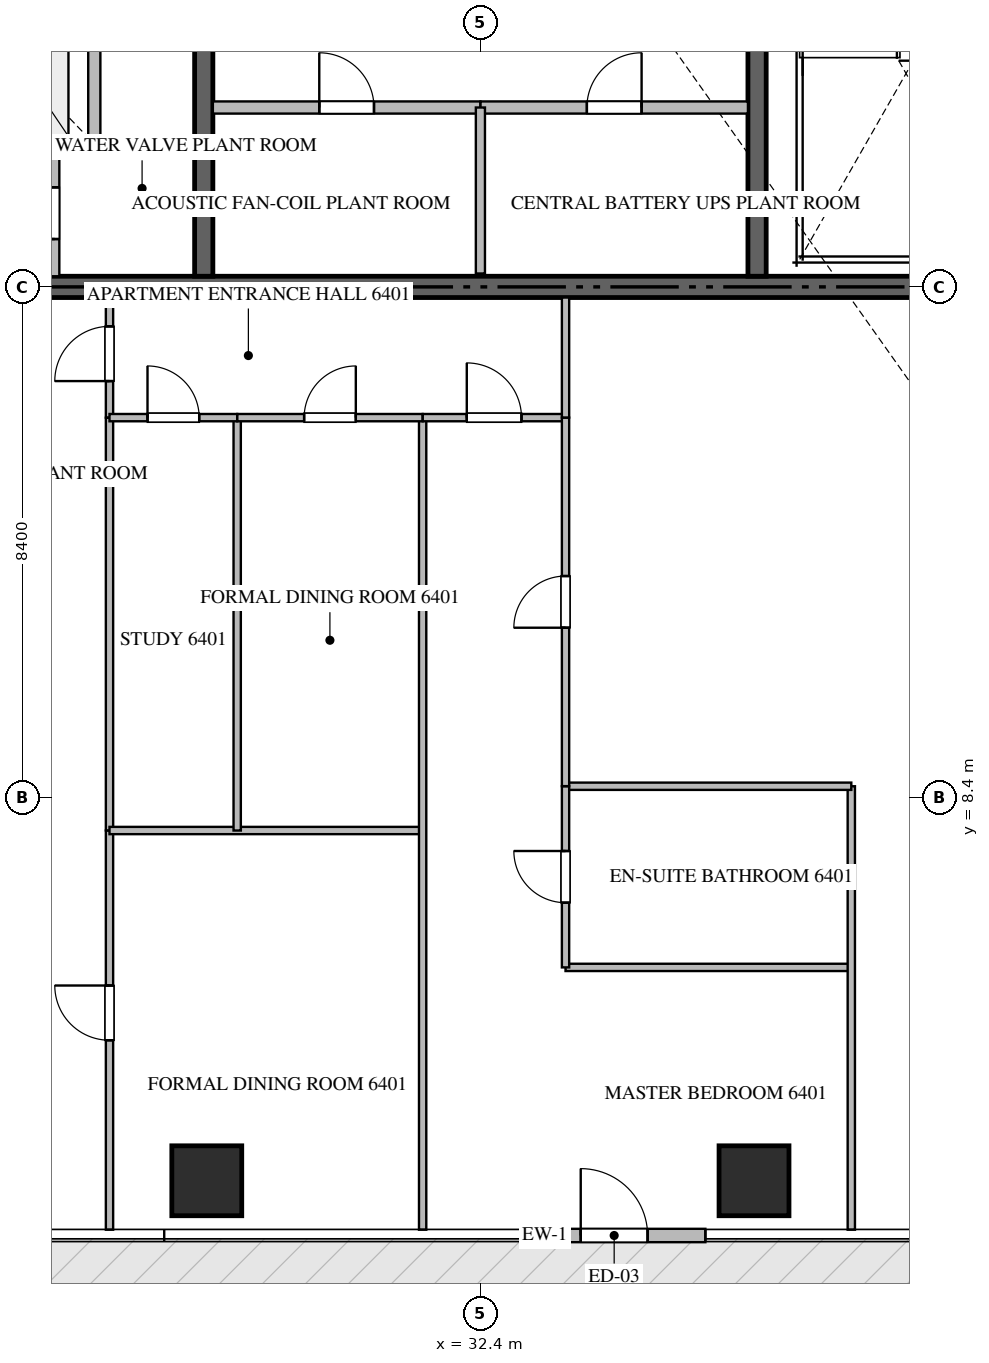
"""IFC4 building model, lengths in metres.
Left out: names, types, materials, properties, quantities, classifications, styles, units other than length and angle.
Written with IfcOpenShell. Run it as: python <this file> out.ifc"""

import sys

from ifc_helpers import new_model, si_unit, direction, frame, frame_2d, origin, origin_2d, place, context, subcontext, project, spatial, rectangle, extrude, source, transform, mapped, element, fill, save


model = new_model("IFC4")
c1 = context("Model", 3, precision=1e-05, world=origin(), true_north=direction((0.0, 1.0)))
c2 = subcontext(c1, "Body", "Model", "MODEL_VIEW")
j1 = project(units=[si_unit("LENGTHUNIT", "METRE"), si_unit("PLANEANGLEUNIT", "RADIAN")], contexts=[c1])
p1 = place(None, origin())
s1 = spatial("IfcSite", under=j1, at=p1, CompositionType="ELEMENT")
p2 = place(p1, origin())
s2 = spatial("IfcBuilding", under=s1, at=p2, CompositionType="ELEMENT")
p3 = place(p2, frame((0.0, 0.0, 256.65)))
s3 = spatial("IfcBuildingStorey", under=s2, at=p3, CompositionType="ELEMENT", Elevation=256.65)
p4 = place(p3, frame((23.4, 16.8, -0.26), z_axis=(0.0, 0.0, 1.0), x_axis=(1.0, 0.0, 0.0)))
e1 = element("IfcWall", 1, at=p4, inside=s3, PredefinedType="SHEAR", context=c2, shape_type="SweptSolid", body=[
    extrude(rectangle(XDim=18.0, YDim=0.35, at=frame_2d((9.0, 0.0))), origin(), (0.0, 0.0, 1.0), 3.848),
])
p5 = place(p3, frame((27.85, 16.975, -0.26), z_axis=(0.0, 0.0, 1.0), x_axis=(0.0, 1.0, 0.0)))
e2 = element("IfcWall", 2, at=p5, inside=s3, PredefinedType="SHEAR", context=c2, shape_type="SweptSolid", body=[
    extrude(rectangle(XDim=4.875, YDim=0.3, at=frame_2d((2.438, 0.0))), origin(), (0.0, 0.0, 1.0), 3.848),
])
p6 = place(p3, frame((36.95, 16.975, -0.26), z_axis=(0.0, 0.0, 1.0), x_axis=(0.0, 1.0, 0.0)))
e3 = element("IfcWall", 3, at=p6, inside=s3, PredefinedType="SHEAR", context=c2, shape_type="SweptSolid", body=[
    extrude(rectangle(XDim=8.375, YDim=0.3, at=frame_2d((4.188, 0.0))), origin(), (0.0, 0.0, 1.0), 3.848),
])
m1 = source(origin(), c2, "Body", "SweptSolid", [
    extrude(rectangle(XDim=1.15, YDim=1.15, at=origin_2d()), origin(), (0.0, 0.0, 1.0), 3.85),
])
for number, where, z_axis, x_axis in (
    (4, (27.9, 2.1, -0.26), (0.0, 0.0, 1.0), (1.0, 0.0, 0.0)),
    (5, (36.9, 2.1, -0.26), (0.0, 0.0, 1.0), (1.0, 0.0, 0.0)),
):
    element("IfcColumn", number, at=place(p3, frame(where, z_axis=z_axis, x_axis=x_axis)), inside=s3, PredefinedType="COLUMN", context=c2, shape_type="MappedRepresentation", body=[
        mapped(m1, transform((0.0, 0.0, 0.0), scale=1.0)),
    ])
p7 = place(p3, frame((33.1, 1.2, 0.0), z_axis=(0.0, 0.0, 1.0), x_axis=(1.0, 0.0, 0.0)))
e6 = element("IfcWall", 6, at=p7, inside=s3, PredefinedType="ELEMENTEDWALL", context=c2, shape_type="SweptSolid", body=[
    extrude(rectangle(XDim=3.0, YDim=0.22, at=frame_2d((1.5, 0.0))), origin(), (0.0, 0.0, 1.0), 3.575),
])
p8 = place(p7, frame((0.95, 0.0, 0.0)))
e7 = element("IfcOpeningElement", 7, at=p8, cuts=e6, PredefinedType="OPENING", context=c2, shape_type="SweptSolid", body=[
    extrude(rectangle(XDim=1.1, YDim=2.2, at=frame_2d((0.55, 1.1))), frame((0.0, 0.12, 0.0), z_axis=(0.0, -1.0, 0.0), x_axis=(1.0, 0.0, 0.0)), (0.0, 0.0, 1.0), 0.24),
])
p9 = place(p3, frame((26.05, 19.05, 0.0), z_axis=(0.0, 0.0, 1.0), x_axis=(0.0, 1.0, 0.0)))
e8 = element("IfcWall", 8, at=p9, inside=s3, PredefinedType="STANDARD", context=c2, shape_type="SweptSolid", body=[
    extrude(rectangle(XDim=2.5, YDim=0.2, at=frame_2d((1.25, 0.0))), origin(), (0.0, 0.0, 1.0), 3.59),
])
p10 = place(p3, frame((23.575, 19.05, 0.0), z_axis=(0.0, 0.0, 1.0), x_axis=(1.0, 0.0, 0.0)))
e9 = element("IfcWall", 9, at=p10, inside=s3, PredefinedType="STANDARD", context=c2, shape_type="SweptSolid", body=[
    extrude(rectangle(XDim=2.475, YDim=0.2, at=frame_2d((1.238, 0.0))), origin(), (0.0, 0.0, 1.0), 3.59),
])
p11 = place(p3, frame((25.4, 16.975, 0.0), z_axis=(0.0, 0.0, 1.0), x_axis=(0.0, 1.0, 0.0)))
e10 = element("IfcWall", 10, at=p11, inside=s3, PredefinedType="PARTITIONING", context=c2, shape_type="SweptSolid", body=[
    extrude(rectangle(XDim=2.075, YDim=0.15, at=frame_2d((1.038, 0.0))), origin(), (0.0, 0.0, 1.0), 3.59),
])
p12 = place(p11, frame((0.612, 0.0, 0.0)))
e11 = element("IfcOpeningElement", 11, at=p12, cuts=e10, PredefinedType="OPENING", context=c2, shape_type="SweptSolid", body=[
    extrude(rectangle(XDim=0.85, YDim=2.1, at=frame_2d((0.425, 1.05))), frame((0.0, 0.085, 0.0), z_axis=(0.0, -1.0, 0.0), x_axis=(1.0, 0.0, 0.0)), (0.0, 0.0, 1.0), 0.17),
])
p13 = place(p3, frame((28.0, 19.75, 0.0), z_axis=(0.0, 0.0, 1.0), x_axis=(1.0, 0.0, 0.0)))
e12 = element("IfcWall", 12, at=p13, inside=s3, PredefinedType="STANDARD", context=c2, shape_type="SweptSolid", body=[
    extrude(rectangle(XDim=4.4, YDim=0.2, at=frame_2d((2.2, 0.0))), origin(), (0.0, 0.0, 1.0), 3.59),
])
p14 = place(p13, frame((1.75, 0.0, 0.0)))
e13 = element("IfcOpeningElement", 13, at=p14, cuts=e12, PredefinedType="OPENING", context=c2, shape_type="SweptSolid", body=[
    extrude(rectangle(XDim=0.9, YDim=2.1, at=frame_2d((0.45, 1.05))), frame((0.0, 0.11, 0.0), z_axis=(0.0, -1.0, 0.0), x_axis=(1.0, 0.0, 0.0)), (0.0, 0.0, 1.0), 0.22),
])
p15 = place(p3, frame((32.402, 19.75, 0.0), z_axis=(0.0, 0.0, 1.0), x_axis=(1.0, 0.0, 0.0)))
e14 = element("IfcWall", 14, at=p15, inside=s3, PredefinedType="STANDARD", context=c2, shape_type="SweptSolid", body=[
    extrude(rectangle(XDim=4.398, YDim=0.2, at=frame_2d((2.199, 0.0))), origin(), (0.0, 0.0, 1.0), 3.59),
])
p16 = place(p15, frame((1.749, 0.0, 0.0)))
e15 = element("IfcOpeningElement", 15, at=p16, cuts=e14, PredefinedType="OPENING", context=c2, shape_type="SweptSolid", body=[
    extrude(rectangle(XDim=0.9, YDim=2.1, at=frame_2d((0.45, 1.05))), frame((0.0, 0.11, 0.0), z_axis=(0.0, -1.0, 0.0), x_axis=(1.0, 0.0, 0.0)), (0.0, 0.0, 1.0), 0.22),
])
p17 = place(p3, frame((32.4, 17.02, 0.0), z_axis=(0.0, 0.0, 1.0), x_axis=(0.0, 1.0, 0.0)))
e16 = element("IfcWall", 16, at=p17, inside=s3, PredefinedType="PARTITIONING", context=c2, shape_type="SweptSolid", body=[
    extrude(rectangle(XDim=2.73, YDim=0.15, at=frame_2d((1.365, 0.0))), origin(), (0.0, 0.0, 1.0), 3.59),
])
p18 = place(p3, frame((26.3, 14.65, 0.0), z_axis=(0.0, 0.0, 1.0), x_axis=(0.0, 1.0, 0.0)))
e17 = element("IfcWall", 17, at=p18, inside=s3, PredefinedType="PARTITIONING", context=c2, shape_type="SweptSolid", body=[
    extrude(rectangle(XDim=1.975, YDim=0.12, at=frame_2d((0.988, 0.0))), origin(), (0.0, 0.0, 1.0), 3.59),
])
p19 = place(p18, frame((0.601, 0.0, 0.0)))
e18 = element("IfcOpeningElement", 18, at=p19, cuts=e17, PredefinedType="OPENING", context=c2, shape_type="SweptSolid", body=[
    extrude(rectangle(XDim=0.9, YDim=2.1, at=frame_2d((0.45, 1.05))), frame((0.0, 0.07, 0.0), z_axis=(0.0, -1.0, 0.0), x_axis=(1.0, 0.0, 0.0)), (0.0, 0.0, 1.0), 0.14),
])
p20 = place(p3, frame((26.3, 1.295, 0.0), z_axis=(0.0, 0.0, 1.0), x_axis=(0.0, 1.0, 0.0)))
e19 = element("IfcWall", 19, at=p20, inside=s3, PredefinedType="PARTITIONING", context=c2, shape_type="SweptSolid", body=[
    extrude(rectangle(XDim=6.565, YDim=0.12, at=frame_2d((3.283, 0.0))), origin(), (0.0, 0.0, 1.0), 3.59),
])
p21 = place(p20, frame((3.116, 0.0, 0.0)))
e20 = element("IfcOpeningElement", 20, at=p21, cuts=e19, PredefinedType="OPENING", context=c2, shape_type="SweptSolid", body=[
    extrude(rectangle(XDim=0.9, YDim=2.1, at=frame_2d((0.45, 1.05))), frame((0.0, 0.07, 0.0), z_axis=(0.0, -1.0, 0.0), x_axis=(1.0, 0.0, 0.0)), (0.0, 0.0, 1.0), 0.14),
])
p22 = place(p3, frame((26.3, 7.862, 0.0), z_axis=(0.0, 0.0, 1.0), x_axis=(0.0, 1.0, 0.0)))
e21 = element("IfcWall", 21, at=p22, inside=s3, PredefinedType="PARTITIONING", context=c2, shape_type="SweptSolid", body=[
    extrude(rectangle(XDim=6.786, YDim=0.12, at=frame_2d((3.393, 0.0))), origin(), (0.0, 0.0, 1.0), 3.59),
])
p23 = place(p3, frame((26.3, 7.86, 0.0), z_axis=(0.0, 0.0, 1.0), x_axis=(1.0, 0.0, 0.0)))
e22 = element("IfcWall", 22, at=p23, inside=s3, PredefinedType="PARTITIONING", context=c2, shape_type="SweptSolid", body=[
    extrude(rectangle(XDim=5.15, YDim=0.12, at=frame_2d((2.575, 0.0))), origin(), (0.0, 0.0, 1.0), 3.59),
])
p24 = place(p3, frame((31.45, 1.295, 0.0), z_axis=(0.0, 0.0, 1.0), x_axis=(0.0, 1.0, 0.0)))
e23 = element("IfcWall", 23, at=p24, inside=s3, PredefinedType="PARTITIONING", context=c2, shape_type="SweptSolid", body=[
    extrude(rectangle(XDim=13.355, YDim=0.12, at=frame_2d((6.677, 0.0))), origin(), (0.0, 0.0, 1.0), 3.59),
])
p25 = place(p3, frame((28.4, 7.86, 0.0), z_axis=(0.0, 0.0, 1.0), x_axis=(0.0, 1.0, 0.0)))
e24 = element("IfcWall", 24, at=p25, inside=s3, PredefinedType="PARTITIONING", context=c2, shape_type="SweptSolid", body=[
    extrude(rectangle(XDim=6.79, YDim=0.12, at=frame_2d((3.395, 0.0))), origin(), (0.0, 0.0, 1.0), 3.59),
])
p26 = place(p3, frame((26.3, 14.65, 0.0), z_axis=(0.0, 0.0, 1.0), x_axis=(1.0, 0.0, 0.0)))
e25 = element("IfcWall", 25, at=p26, inside=s3, PredefinedType="PARTITIONING", context=c2, shape_type="SweptSolid", body=[
    extrude(rectangle(XDim=2.1, YDim=0.12, at=frame_2d((1.05, 0.0))), origin(), (0.0, 0.0, 1.0), 3.59),
])
p27 = place(p26, frame((0.625, 0.0, 0.0)))
e26 = element("IfcOpeningElement", 26, at=p27, cuts=e25, PredefinedType="OPENING", context=c2, shape_type="SweptSolid", body=[
    extrude(rectangle(XDim=0.85, YDim=2.1, at=frame_2d((0.425, 1.05))), frame((0.0, 0.07, 0.0), z_axis=(0.0, -1.0, 0.0), x_axis=(1.0, 0.0, 0.0)), (0.0, 0.0, 1.0), 0.14),
])
p28 = place(p3, frame((28.402, 14.65, 0.0), z_axis=(0.0, 0.0, 1.0), x_axis=(1.0, 0.0, 0.0)))
e27 = element("IfcWall", 27, at=p28, inside=s3, PredefinedType="PARTITIONING", context=c2, shape_type="SweptSolid", body=[
    extrude(rectangle(XDim=3.048, YDim=0.12, at=frame_2d((1.524, 0.0))), origin(), (0.0, 0.0, 1.0), 3.59),
])
p29 = place(p28, frame((1.099, 0.0, 0.0)))
e28 = element("IfcOpeningElement", 28, at=p29, cuts=e27, PredefinedType="OPENING", context=c2, shape_type="SweptSolid", body=[
    extrude(rectangle(XDim=0.85, YDim=2.1, at=frame_2d((0.425, 1.05))), frame((0.0, 0.07, 0.0), z_axis=(0.0, -1.0, 0.0), x_axis=(1.0, 0.0, 0.0)), (0.0, 0.0, 1.0), 0.14),
])
p30 = place(p3, frame((31.452, 14.65, 0.0), z_axis=(0.0, 0.0, 1.0), x_axis=(1.0, 0.0, 0.0)))
e29 = element("IfcWall", 29, at=p30, inside=s3, PredefinedType="PARTITIONING", context=c2, shape_type="SweptSolid", body=[
    extrude(rectangle(XDim=2.348, YDim=0.12, at=frame_2d((1.174, 0.0))), origin(), (0.0, 0.0, 1.0), 3.59),
])
p31 = place(p30, frame((0.724, 0.0, 0.0)))
e30 = element("IfcOpeningElement", 30, at=p31, cuts=e29, PredefinedType="OPENING", context=c2, shape_type="SweptSolid", body=[
    extrude(rectangle(XDim=0.9, YDim=2.1, at=frame_2d((0.45, 1.05))), frame((0.0, 0.07, 0.0), z_axis=(0.0, -1.0, 0.0), x_axis=(1.0, 0.0, 0.0)), (0.0, 0.0, 1.0), 0.14),
])
p32 = place(p3, frame((33.8, 5.609, 0.0), z_axis=(0.0, 0.0, 1.0), x_axis=(1.0, 0.0, 0.0)))
e31 = element("IfcWall", 31, at=p32, inside=s3, PredefinedType="PARTITIONING", context=c2, shape_type="SweptSolid", body=[
    extrude(rectangle(XDim=4.7, YDim=0.12, at=frame_2d((2.35, 0.0))), origin(), (0.0, 0.0, 1.0), 3.59),
])
p33 = place(p3, frame((38.5, 1.295, 0.0), z_axis=(0.0, 0.0, 1.0), x_axis=(0.0, 1.0, 0.0)))
e32 = element("IfcWall", 32, at=p33, inside=s3, PredefinedType="PARTITIONING", context=c2, shape_type="SweptSolid", body=[
    extrude(rectangle(XDim=7.293, YDim=0.12, at=frame_2d((3.646, 0.0))), origin(), (0.0, 0.0, 1.0), 3.59),
])
p34 = place(p3, frame((33.8, 8.588, 0.0), z_axis=(0.0, 0.0, 1.0), x_axis=(1.0, 0.0, 0.0)))
e33 = element("IfcWall", 33, at=p34, inside=s3, PredefinedType="PARTITIONING", context=c2, shape_type="SweptSolid", body=[
    extrude(rectangle(XDim=4.7, YDim=0.12, at=frame_2d((2.35, 0.0))), origin(), (0.0, 0.0, 1.0), 3.59),
])
p35 = place(p3, frame((33.8, 5.609, 0.0), z_axis=(0.0, 0.0, 1.0), x_axis=(0.0, 1.0, 0.0)))
e34 = element("IfcWall", 34, at=p35, inside=s3, PredefinedType="PARTITIONING", context=c2, shape_type="SweptSolid", body=[
    extrude(rectangle(XDim=2.979, YDim=0.12, at=frame_2d((1.49, 0.0))), origin(), (0.0, 0.0, 1.0), 3.59),
])
p36 = place(p35, frame((1.064, 0.0, 0.0)))
e35 = element("IfcOpeningElement", 35, at=p36, cuts=e34, PredefinedType="OPENING", context=c2, shape_type="SweptSolid", body=[
    extrude(rectangle(XDim=0.85, YDim=2.1, at=frame_2d((0.425, 1.05))), frame((0.0, 0.07, 0.0), z_axis=(0.0, -1.0, 0.0), x_axis=(1.0, 0.0, 0.0)), (0.0, 0.0, 1.0), 0.14),
])
p37 = place(p3, frame((33.8, 8.59, 0.0), z_axis=(0.0, 0.0, 1.0), x_axis=(0.0, 1.0, 0.0)))
e36 = element("IfcWall", 36, at=p37, inside=s3, PredefinedType="PARTITIONING", context=c2, shape_type="SweptSolid", body=[
    extrude(rectangle(XDim=6.06, YDim=0.12, at=frame_2d((3.03, 0.0))), origin(), (0.0, 0.0, 1.0), 3.59),
])
p38 = place(p37, frame((2.605, 0.0, 0.0)))
e37 = element("IfcOpeningElement", 37, at=p38, cuts=e36, PredefinedType="OPENING", context=c2, shape_type="SweptSolid", body=[
    extrude(rectangle(XDim=0.85, YDim=2.1, at=frame_2d((0.425, 1.05))), frame((0.0, 0.07, 0.0), z_axis=(0.0, -1.0, 0.0), x_axis=(1.0, 0.0, 0.0)), (0.0, 0.0, 1.0), 0.14),
])
p39 = place(p3, frame((33.8, 14.652, 0.0), z_axis=(0.0, 0.0, 1.0), x_axis=(0.0, 1.0, 0.0)))
e38 = element("IfcWall", 38, at=p39, inside=s3, PredefinedType="PARTITIONING", context=c2, shape_type="SweptSolid", body=[
    extrude(rectangle(XDim=1.973, YDim=0.12, at=frame_2d((0.986, 0.0))), origin(), (0.0, 0.0, 1.0), 3.59),
])
m2 = source(origin(), c2, "Body", "SweptSolid", [
    extrude(rectangle(XDim=1.1, YDim=2.2, at=frame_2d((0.55, 1.1))), frame((0.0, 0.025, 0.0), z_axis=(0.0, -1.0, 0.0), x_axis=(1.0, 0.0, 0.0)), (0.0, 0.0, 1.0), 0.05),
])
p40 = place(p8, origin())
e39 = element("IfcDoor", 39, at=p40, inside=s3, OperationType="SINGLE_SWING_LEFT", PredefinedType="DOOR", context=c2, shape_type="MappedRepresentation", body=[
    mapped(m2, transform((0.0, 0.0, 0.0), scale=1.0)),
])
fill(e7, e39)
m3 = source(origin(), c2, "Body", "SweptSolid", [
    extrude(rectangle(XDim=0.85, YDim=2.1, at=frame_2d((0.425, 1.05))), frame((0.0, 0.025, 0.0), z_axis=(0.0, -1.0, 0.0), x_axis=(1.0, 0.0, 0.0)), (0.0, 0.0, 1.0), 0.05),
])
p41 = place(p12, origin())
e40 = element("IfcDoor", 40, at=p41, inside=s3, OperationType="SINGLE_SWING_LEFT", PredefinedType="DOOR", context=c2, shape_type="MappedRepresentation", body=[
    mapped(m3, transform((0.0, 0.0, 0.0), scale=1.0)),
])
fill(e11, e40)
m4 = source(origin(), c2, "Body", "SweptSolid", [
    extrude(rectangle(XDim=0.9, YDim=2.1, at=frame_2d((0.45, 1.05))), frame((0.0, 0.025, 0.0), z_axis=(0.0, -1.0, 0.0), x_axis=(1.0, 0.0, 0.0)), (0.0, 0.0, 1.0), 0.05),
])
p42 = place(p14, origin())
e41 = element("IfcDoor", 41, at=p42, inside=s3, OperationType="SINGLE_SWING_LEFT", PredefinedType="DOOR", context=c2, shape_type="MappedRepresentation", body=[
    mapped(m4, transform((0.0, 0.0, 0.0), scale=1.0)),
])
fill(e13, e41)
p43 = place(p16, origin())
e42 = element("IfcDoor", 42, at=p43, inside=s3, OperationType="SINGLE_SWING_RIGHT", PredefinedType="DOOR", context=c2, shape_type="MappedRepresentation", body=[
    mapped(m4, transform((0.0, 0.0, 0.0), scale=1.0)),
])
fill(e15, e42)
p44 = place(p19, origin())
e43 = element("IfcDoor", 43, at=p44, inside=s3, OperationType="SINGLE_SWING_LEFT", PredefinedType="DOOR", context=c2, shape_type="MappedRepresentation", body=[
    mapped(m4, transform((0.0, 0.0, 0.0), scale=1.0)),
])
fill(e18, e43)
p45 = place(p21, origin())
e44 = element("IfcDoor", 44, at=p45, inside=s3, OperationType="SINGLE_SWING_RIGHT", PredefinedType="DOOR", context=c2, shape_type="MappedRepresentation", body=[
    mapped(m4, transform((0.0, 0.0, 0.0), scale=1.0)),
])
fill(e20, e44)
p46 = place(p27, origin())
e45 = element("IfcDoor", 45, at=p46, inside=s3, OperationType="SINGLE_SWING_LEFT", PredefinedType="DOOR", context=c2, shape_type="MappedRepresentation", body=[
    mapped(m3, transform((0.0, 0.0, 0.0), scale=1.0)),
])
fill(e26, e45)
p47 = place(p29, origin())
e46 = element("IfcDoor", 46, at=p47, inside=s3, OperationType="SINGLE_SWING_RIGHT", PredefinedType="DOOR", context=c2, shape_type="MappedRepresentation", body=[
    mapped(m3, transform((0.0, 0.0, 0.0), scale=1.0)),
])
fill(e28, e46)
p48 = place(p31, origin())
e47 = element("IfcDoor", 47, at=p48, inside=s3, OperationType="SINGLE_SWING_LEFT", PredefinedType="DOOR", context=c2, shape_type="MappedRepresentation", body=[
    mapped(m4, transform((0.0, 0.0, 0.0), scale=1.0)),
])
fill(e30, e47)
p49 = place(p36, origin())
e48 = element("IfcDoor", 48, at=p49, inside=s3, OperationType="SINGLE_SWING_RIGHT", PredefinedType="DOOR", context=c2, shape_type="MappedRepresentation", body=[
    mapped(m3, transform((0.0, 0.0, 0.0), scale=1.0)),
])
fill(e35, e48)
p50 = place(p38, origin())
e49 = element("IfcDoor", 49, at=p50, inside=s3, OperationType="SINGLE_SWING_LEFT", PredefinedType="DOOR", context=c2, shape_type="MappedRepresentation", body=[
    mapped(m3, transform((0.0, 0.0, 0.0), scale=1.0)),
])
fill(e37, e49)
save(model, sys.argv[1])
